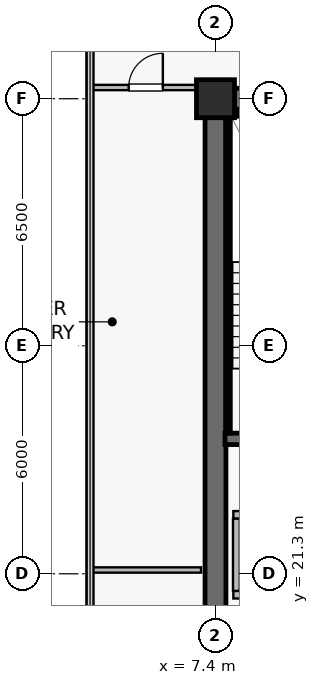
"""IFC4 building model, lengths in metres.
Left out: names, types, materials, properties, quantities, classifications, styles, units other than length and angle.
Written with IfcOpenShell. Run it as: python <this file> out.ifc"""

import sys

from ifc_helpers import new_model, si_unit, direction, frame, frame_2d, origin, origin_2d, place, context, subcontext, project, spatial, rectangle, extrude, source, transform, mapped, element, fill, save


model = new_model("IFC4")
c1 = context("Model", 3, precision=1e-05, world=origin(), true_north=direction((0.0, 1.0)))
c2 = subcontext(c1, "Body", "Model", "MODEL_VIEW")
j1 = project(units=[si_unit("LENGTHUNIT", "METRE"), si_unit("PLANEANGLEUNIT", "RADIAN")], contexts=[c1])
p1 = place(None, origin())
s1 = spatial("IfcSite", under=j1, at=p1, CompositionType="ELEMENT")
p2 = place(p1, origin())
s2 = spatial("IfcBuilding", under=s1, at=p2, CompositionType="ELEMENT")
p3 = place(p2, frame((0.0, 0.0, 230.1)))
s3 = spatial("IfcBuildingStorey", under=s2, at=p3, CompositionType="ELEMENT", Elevation=230.1)
p4 = place(p3, frame((7.125, 33.8, 0.0), z_axis=(0.0, 0.0, 1.0), x_axis=(1.0, 0.0, 0.0)))
e1 = element("IfcWall", 1, at=p4, inside=s3, PredefinedType="SHEAR", context=c2, shape_type="SweptSolid", body=[
    extrude(rectangle(XDim=15.35, YDim=0.55, at=frame_2d((7.675, 0.0))), origin(), (0.0, 0.0, 1.0), 3.8),
])
p5 = place(p4, frame((8.325, 0.0, 0.0)))
e2 = element("IfcOpeningElement", 2, at=p5, cuts=e1, PredefinedType="OPENING", context=c2, shape_type="SweptSolid", body=[
    extrude(rectangle(XDim=0.95, YDim=2.15, at=frame_2d((0.475, 1.075))), frame((0.0, 0.285, 0.0), z_axis=(0.0, -1.0, 0.0), x_axis=(1.0, 0.0, 0.0)), (0.0, 0.0, 1.0), 0.57),
])
p6 = place(p4, frame((11.865, 0.0, 0.0)))
e3 = element("IfcOpeningElement", 3, at=p6, cuts=e1, PredefinedType="OPENING", context=c2, shape_type="SweptSolid", body=[
    extrude(rectangle(XDim=0.95, YDim=2.15, at=frame_2d((0.475, 1.075))), frame((0.0, 0.285, 0.0), z_axis=(0.0, -1.0, 0.0), x_axis=(1.0, 0.0, 0.0)), (0.0, 0.0, 1.0), 0.57),
])
p7 = place(p3, frame((7.4, 15.075, 0.0), z_axis=(0.0, 0.0, 1.0), x_axis=(0.0, 1.0, 0.0)))
e4 = element("IfcWall", 4, at=p7, inside=s3, PredefinedType="SHEAR", context=c2, shape_type="SweptSolid", body=[
    extrude(rectangle(XDim=18.45, YDim=0.55, at=frame_2d((9.225, 0.0))), origin(), (0.0, 0.0, 1.0), 3.8),
])
p8 = place(p3, frame((7.65, 24.85, 0.0), z_axis=(0.0, 0.0, 1.0), x_axis=(1.0, 0.0, 0.0)))
e5 = element("IfcWall", 5, at=p8, inside=s3, PredefinedType="SHEAR", context=c2, shape_type="SweptSolid", body=[
    extrude(rectangle(XDim=3.8, YDim=0.3, at=frame_2d((1.9, 0.0))), origin(), (0.0, 0.0, 1.0), 3.8),
])
p9 = place(p3, frame((7.73, 33.4, 0.0), z_axis=(0.0, 0.0, 1.0), x_axis=(1.0, 0.0, 0.0)))
e6 = element("IfcWall", 6, at=p9, inside=s3, PredefinedType="SOLIDWALL", context=c2, shape_type="SweptSolid", body=[
    extrude(rectangle(XDim=3.72, YDim=0.12, at=frame_2d((1.86, 0.0))), origin(), (0.0, 0.0, 1.0), 3.8),
])
p10 = place(p3, frame((7.73, 25.0, 0.0), z_axis=(0.0, 0.0, 1.0), x_axis=(0.0, 1.0, 0.0)))
e7 = element("IfcWall", 7, at=p10, inside=s3, PredefinedType="SOLIDWALL", context=c2, shape_type="SweptSolid", body=[
    extrude(rectangle(XDim=8.32, YDim=0.12, at=frame_2d((4.16, 0.0))), origin(), (0.0, 0.0, 1.0), 3.8),
])
m1 = source(origin(), c2, "Body", "SweptSolid", [
    extrude(rectangle(XDim=1.0, YDim=1.0, at=origin_2d()), origin(), (0.0, 0.0, 1.0), 4.1),
])
p11 = place(p3, frame((7.4, 33.8, 0.0), z_axis=(0.0, 0.0, 1.0), x_axis=(1.0, 0.0, 0.0)))
e8 = element("IfcColumn", 8, at=p11, inside=s3, PredefinedType="COLUMN", context=c2, shape_type="MappedRepresentation", body=[
    mapped(m1, transform((0.0, 0.0, 0.0), scale=1.0)),
])
p12 = place(p3, frame((7.87, 20.75, 0.0), z_axis=(0.0, 0.0, 1.0), x_axis=(1.0, 0.0, 0.0)))
e9 = element("IfcWall", 9, at=p12, inside=s3, PredefinedType="SOLIDWALL", context=c2, shape_type="SweptSolid", body=[
    extrude(rectangle(XDim=2.26, YDim=0.2, at=frame_2d((1.13, 0.0))), origin(), (0.0, 0.0, 1.0), 3.8),
])
p13 = place(p12, frame((0.58, 0.0, 0.0)))
e10 = element("IfcOpeningElement", 10, at=p13, cuts=e9, PredefinedType="OPENING", context=c2, shape_type="SweptSolid", body=[
    extrude(rectangle(XDim=1.1, YDim=2.22, at=frame_2d((0.55, 1.11))), frame((0.0, 0.11, 0.0), z_axis=(0.0, -1.0, 0.0), x_axis=(1.0, 0.0, 0.0)), (0.0, 0.0, 1.0), 0.22),
])
p14 = place(p3, frame((7.87, 22.85, 0.0), z_axis=(0.0, 0.0, 1.0), x_axis=(1.0, 0.0, 0.0)))
e11 = element("IfcWall", 11, at=p14, inside=s3, PredefinedType="SOLIDWALL", context=c2, shape_type="SweptSolid", body=[
    extrude(rectangle(XDim=2.26, YDim=0.2, at=frame_2d((1.13, 0.0))), origin(), (0.0, 0.0, 1.0), 3.8),
])
p15 = place(p3, frame((7.95, 20.85, 0.0), z_axis=(0.0, 0.0, 1.0), x_axis=(0.0, 1.0, 0.0)))
e12 = element("IfcWall", 12, at=p15, inside=s3, PredefinedType="SOLIDWALL", context=c2, shape_type="SweptSolid", body=[
    extrude(rectangle(XDim=1.9, YDim=0.18, at=frame_2d((0.95, 0.0))), origin(), (0.0, 0.0, 1.0), 3.8),
])
p16 = place(p3, frame((4.11, 21.4, 0.0), z_axis=(0.0, 0.0, 1.0), x_axis=(1.0, 0.0, 0.0)))
e13 = element("IfcWall", 13, at=p16, inside=s3, PredefinedType="PARTITIONING", context=c2, shape_type="SweptSolid", body=[
    extrude(rectangle(XDim=2.91, YDim=0.14, at=frame_2d((1.455, 0.0))), origin(), (0.0, 0.0, 1.0), 3.8),
])
p17 = place(p3, frame((4.11, 34.095, 0.0), z_axis=(0.0, 0.0, 1.0), x_axis=(1.0, 0.0, 0.0)))
e14 = element("IfcWall", 14, at=p17, inside=s3, PredefinedType="PARTITIONING", context=c2, shape_type="SweptSolid", body=[
    extrude(rectangle(XDim=2.91, YDim=0.14, at=frame_2d((1.455, 0.0))), origin(), (0.0, 0.0, 1.0), 3.8),
])
p18 = place(p17, frame((1.005, 0.0, 0.0)))
e15 = element("IfcOpeningElement", 15, at=p18, cuts=e14, PredefinedType="OPENING", context=c2, shape_type="SweptSolid", body=[
    extrude(rectangle(XDim=0.9, YDim=2.1, at=frame_2d((0.45, 1.05))), frame((0.0, 0.08, 0.0), z_axis=(0.0, -1.0, 0.0), x_axis=(1.0, 0.0, 0.0)), (0.0, 0.0, 1.0), 0.16),
])
m2 = source(origin(), c2, "Body", "SweptSolid", [
    extrude(rectangle(XDim=0.9, YDim=2.1, at=frame_2d((0.45, 1.05))), frame((0.0, 0.025, 0.0), z_axis=(0.0, -1.0, 0.0), x_axis=(1.0, 0.0, 0.0)), (0.0, 0.0, 1.0), 0.05),
])
p19 = place(p18, origin())
e16 = element("IfcDoor", 16, at=p19, inside=s3, OperationType="SINGLE_SWING_RIGHT", PredefinedType="DOOR", context=c2, shape_type="MappedRepresentation", body=[
    mapped(m2, transform((0.0, 0.0, 0.0), scale=1.0)),
])
fill(e15, e16)
save(model, sys.argv[1])
